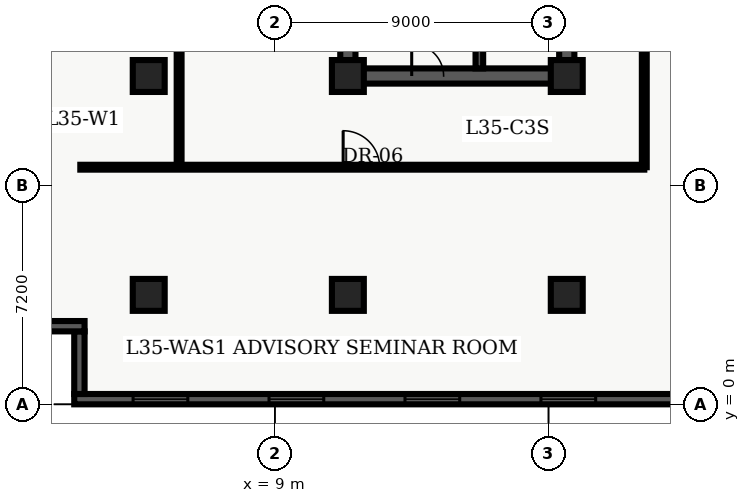
"""IFC4 building model, lengths in metres.
Left out: names, types, materials, properties, quantities, classifications, styles, units other than length and angle.
Written with IfcOpenShell. Run it as: python <this file> out.ifc"""

import sys

from ifc_helpers import new_model, entity, si_unit, converted_unit, direction, frame, origin_with_axes, origin_2d_with_axis, place, context, subcontext, project, spatial, polyline, rectangle, outline, extrude, element, fill, save


model = new_model("IFC4")
c1 = context("Model", 3, precision=1e-05, world=origin_with_axes(), true_north=direction((0.0, 1.0)))
c2 = subcontext(c1, "Body", "Model", "MODEL_VIEW")
j1 = project(units=[si_unit("LENGTHUNIT", "METRE"), converted_unit("PLANEANGLEUNIT", "DEGREE", entity("IfcPlaneAngleMeasure", 0.017), si_unit("PLANEANGLEUNIT", "RADIAN"), dimensions=[0, 0, 0, 0, 0, 0, 0])], contexts=[c1])
p1 = place(None, origin_with_axes())
s1 = spatial("IfcSite", under=j1, at=p1, CompositionType="ELEMENT")
p2 = place(p1, origin_with_axes())
s2 = spatial("IfcBuilding", under=s1, at=p2, CompositionType="ELEMENT")
p3 = place(p2, frame((0.0, 0.0, 144.6), z_axis=(0.0, 0.0, 1.0), x_axis=(1.0, 0.0, 0.0)))
s3 = spatial("IfcBuildingStorey", under=s2, at=p3, CompositionType="ELEMENT", Elevation=144.6)
p4 = place(p3, frame((11.4, 10.8, 0.0), z_axis=(0.0, 0.0, 1.0), x_axis=(0.0, 1.0, 0.0)))
e1 = element("IfcWall", 1, at=p4, inside=s3, PredefinedType="SHEAR", context=c2, shape_type="SweptSolid", body=[
    extrude(outline(polyline([(0.0, -0.25), (27.0, -0.25), (27.0, 0.25), (0.0, 0.25), (0.0, -0.25)])), origin_with_axes(), (0.0, 0.0, 1.0), 3.66),
])
p5 = place(p3, frame((11.4, 10.8, 0.0), z_axis=(0.0, 0.0, 1.0), x_axis=(1.0, 0.0, 0.0)))
e2 = element("IfcWall", 2, at=p5, inside=s3, PredefinedType="SHEAR", context=c2, shape_type="SweptSolid", body=[
    extrude(outline(polyline([(0.0, -0.25), (7.2, -0.25), (7.2, 0.25), (0.0, 0.25), (0.0, -0.25)])), origin_with_axes(), (0.0, 0.0, 1.0), 3.66),
])
p6 = place(p5, frame((2.625, 0.0, 0.0), z_axis=(0.0, 0.0, 1.0), x_axis=(1.0, 0.0, 0.0)))
e3 = element("IfcOpeningElement", 3, at=p6, cuts=e2, PredefinedType="OPENING", context=c2, shape_type="SweptSolid", body=[
    extrude(rectangle(XDim=1.05, YDim=0.52, at=origin_2d_with_axis()), origin_with_axes(), (0.0, 0.0, 1.0), 2.15),
])
p7 = place(p3, frame((18.6, 10.8, 0.0), z_axis=(0.0, 0.0, 1.0), x_axis=(0.0, 1.0, 0.0)))
e4 = element("IfcWall", 4, at=p7, inside=s3, PredefinedType="SHEAR", context=c2, shape_type="SweptSolid", body=[
    extrude(outline(polyline([(0.0, -0.25), (13.5, -0.25), (13.5, 0.25), (0.0, 0.25), (0.0, -0.25)])), origin_with_axes(), (0.0, 0.0, 1.0), 3.66),
])
p8 = place(p7, frame((11.125, 0.0, 0.0), z_axis=(0.0, 0.0, 1.0), x_axis=(1.0, 0.0, 0.0)))
e5 = element("IfcOpeningElement", 5, at=p8, cuts=e4, PredefinedType="OPENING", context=c2, shape_type="SweptSolid", body=[
    extrude(rectangle(XDim=1.05, YDim=0.52, at=origin_2d_with_axis()), origin_with_axes(), (0.0, 0.0, 1.0), 2.15),
])
p9 = place(p7, frame((2.425, 0.0, 0.0), z_axis=(0.0, 0.0, 1.0), x_axis=(1.0, 0.0, 0.0)))
e6 = element("IfcOpeningElement", 6, at=p9, cuts=e4, PredefinedType="OPENING", context=c2, shape_type="SweptSolid", body=[
    extrude(rectangle(XDim=1.05, YDim=0.52, at=origin_2d_with_axis()), origin_with_axes(), (0.0, 0.0, 1.0), 2.15),
])
p10 = place(p7, frame((6.725, 0.0, 0.0), z_axis=(0.0, 0.0, 1.0), x_axis=(1.0, 0.0, 0.0)))
e7 = element("IfcOpeningElement", 7, at=p10, cuts=e4, PredefinedType="OPENING", context=c2, shape_type="SweptSolid", body=[
    extrude(rectangle(XDim=1.05, YDim=0.52, at=origin_2d_with_axis()), origin_with_axes(), (0.0, 0.0, 1.0), 2.15),
])
p11 = place(p3, frame((15.725, 11.05, 0.0), z_axis=(0.0, 0.0, 1.0), x_axis=(0.0, 1.0, 0.0)))
e8 = element("IfcWall", 8, at=p11, inside=s3, PredefinedType="SHEAR", context=c2, shape_type="SweptSolid", body=[
    extrude(outline(polyline([(0.0, -0.125), (8.65, -0.125), (8.65, 0.125), (0.0, 0.125), (0.0, -0.125)])), origin_with_axes(), (0.0, 0.0, 1.0), 3.66),
])
for number, where, z_axis, x_axis in (
    (9, (11.4, 3.6, 0.0), (0.0, 0.0, 1.0), (1.0, 0.0, 0.0)),
    (10, (11.4, 10.8, 0.0), (0.0, 0.0, 1.0), (1.0, 0.0, 0.0)),
    (11, (18.6, 3.6, 0.0), (0.0, 0.0, 1.0), (1.0, 0.0, 0.0)),
    (12, (18.6, 10.8, 0.0), (0.0, 0.0, 1.0), (1.0, 0.0, 0.0)),
    (13, (4.85, 3.6, 0.0), (0.0, 0.0, 1.0), (1.0, 0.0, 0.0)),
    (14, (4.85, 10.8, 0.0), (0.0, 0.0, 1.0), (1.0, 0.0, 0.0)),
):
    element("IfcColumn", number, at=place(p3, frame(where, z_axis=z_axis, x_axis=x_axis)), inside=s3, PredefinedType="COLUMN", context=c2, shape_type="SweptSolid", body=[
        extrude(rectangle(XDim=1.05, YDim=1.05, at=origin_2d_with_axis()), origin_with_axes(), (0.0, 0.0, 1.0), 3.9),
    ])
p12 = place(p3, frame((2.6, 7.8, 0.0), z_axis=(0.0, 0.0, 1.0), x_axis=(1.0, 0.0, 0.0)))
e15 = element("IfcWall", 15, at=p12, inside=s3, PredefinedType="PARTITIONING", context=c2, shape_type="SweptSolid", body=[
    extrude(outline(polyline([(0.0, -0.08), (18.55, -0.08), (18.55, 0.08), (0.0, 0.08), (0.0, -0.08)])), origin_with_axes(), (0.0, 0.0, 1.0), 2.7),
])
p13 = place(p12, frame((9.245, 0.0, 0.0), z_axis=(0.0, 0.0, 1.0), x_axis=(1.0, 0.0, 0.0)))
e16 = element("IfcOpeningElement", 16, at=p13, cuts=e15, PredefinedType="OPENING", context=c2, shape_type="SweptSolid", body=[
    extrude(rectangle(XDim=1.2, YDim=0.18, at=origin_2d_with_axis()), origin_with_axes(), (0.0, 0.0, 1.0), 2.2),
])
p14 = place(p3, frame((21.15, 7.8, 0.0), z_axis=(0.0, 0.0, 1.0), x_axis=(0.0, 1.0, 0.0)))
e17 = element("IfcWall", 17, at=p14, inside=s3, PredefinedType="PARTITIONING", context=c2, shape_type="SweptSolid", body=[
    extrude(outline(polyline([(0.0, -0.08), (32.7, -0.08), (32.7, 0.08), (0.0, 0.08), (0.0, -0.08)])), origin_with_axes(), (0.0, 0.0, 1.0), 2.7),
])
p15 = place(p14, frame((5.475, 0.0, 0.0), z_axis=(0.0, 0.0, 1.0), x_axis=(1.0, 0.0, 0.0)))
e18 = element("IfcOpeningElement", 18, at=p15, cuts=e17, PredefinedType="OPENING", context=c2, shape_type="SweptSolid", body=[
    extrude(rectangle(XDim=1.05, YDim=0.18, at=origin_2d_with_axis()), origin_with_axes(), (0.0, 0.0, 1.0), 2.15),
])
p16 = place(p3, frame((5.85, 7.8, 0.0), z_axis=(0.0, 0.0, 1.0), x_axis=(0.0, 1.0, 0.0)))
e19 = element("IfcWall", 19, at=p16, inside=s3, PredefinedType="PARTITIONING", context=c2, shape_type="SweptSolid", body=[
    extrude(outline(polyline([(0.0, -0.08), (32.7, -0.08), (32.7, 0.08), (0.0, 0.08), (0.0, -0.08)])), origin_with_axes(), (0.0, 0.0, 1.0), 2.7),
])
p17 = place(p16, frame((7.181, 0.0, 0.0), z_axis=(0.0, 0.0, 1.0), x_axis=(1.0, 0.0, 0.0)))
e20 = element("IfcOpeningElement", 20, at=p17, cuts=e19, PredefinedType="OPENING", context=c2, shape_type="SweptSolid", body=[
    extrude(rectangle(XDim=1.0, YDim=0.18, at=origin_2d_with_axis()), origin_with_axes(), (0.0, 0.0, 1.0), 2.15),
])
p18 = place(p16, frame((23.401, 0.0, 0.0), z_axis=(0.0, 0.0, 1.0), x_axis=(1.0, 0.0, 0.0)))
e21 = element("IfcOpeningElement", 21, at=p18, cuts=e19, PredefinedType="OPENING", context=c2, shape_type="SweptSolid", body=[
    extrude(rectangle(XDim=1.0, YDim=0.18, at=origin_2d_with_axis()), origin_with_axes(), (0.0, 0.0, 1.0), 2.15),
])
p19 = place(p3, frame((57.26, 0.17, 0.0), z_axis=(0.0, 0.0, 1.0), x_axis=(-1.0, 0.0, 0.0)))
e22 = element("IfcWall", 22, at=p19, inside=s3, PredefinedType="SOLIDWALL", context=c2, shape_type="SweptSolid", body=[
    extrude(outline(polyline([(0.0, -0.17), (54.86, -0.17), (54.86, 0.17), (0.0, 0.17), (0.0, -0.17)])), origin_with_axes(), (0.0, 0.0, 1.0), 3.66),
])
p20 = place(p19, frame((2.836, 0.0, 0.45), z_axis=(0.0, 0.0, 1.0), x_axis=(1.0, 0.0, 0.0)))
e23 = element("IfcOpeningElement", 23, at=p20, cuts=e22, PredefinedType="OPENING", context=c2, shape_type="SweptSolid", body=[
    extrude(rectangle(XDim=1.8, YDim=0.36, at=origin_2d_with_axis()), origin_with_axes(), (0.0, 0.0, 1.0), 2.1),
])
p21 = place(p19, frame((7.307, 0.0, 0.45), z_axis=(0.0, 0.0, 1.0), x_axis=(1.0, 0.0, 0.0)))
e24 = element("IfcOpeningElement", 24, at=p21, cuts=e22, PredefinedType="OPENING", context=c2, shape_type="SweptSolid", body=[
    extrude(rectangle(XDim=1.8, YDim=0.36, at=origin_2d_with_axis()), origin_with_axes(), (0.0, 0.0, 1.0), 2.1),
])
p22 = place(p19, frame((11.779, 0.0, 0.45), z_axis=(0.0, 0.0, 1.0), x_axis=(1.0, 0.0, 0.0)))
e25 = element("IfcOpeningElement", 25, at=p22, cuts=e22, PredefinedType="OPENING", context=c2, shape_type="SweptSolid", body=[
    extrude(rectangle(XDim=1.8, YDim=0.36, at=origin_2d_with_axis()), origin_with_axes(), (0.0, 0.0, 1.0), 2.1),
])
p23 = place(p19, frame((16.251, 0.0, 0.45), z_axis=(0.0, 0.0, 1.0), x_axis=(1.0, 0.0, 0.0)))
e26 = element("IfcOpeningElement", 26, at=p23, cuts=e22, PredefinedType="OPENING", context=c2, shape_type="SweptSolid", body=[
    extrude(rectangle(XDim=1.8, YDim=0.36, at=origin_2d_with_axis()), origin_with_axes(), (0.0, 0.0, 1.0), 2.1),
])
p24 = place(p19, frame((20.723, 0.0, 0.45), z_axis=(0.0, 0.0, 1.0), x_axis=(1.0, 0.0, 0.0)))
e27 = element("IfcOpeningElement", 27, at=p24, cuts=e22, PredefinedType="OPENING", context=c2, shape_type="SweptSolid", body=[
    extrude(rectangle(XDim=1.8, YDim=0.36, at=origin_2d_with_axis()), origin_with_axes(), (0.0, 0.0, 1.0), 2.1),
])
p25 = place(p19, frame((34.138, 0.0, 0.45), z_axis=(0.0, 0.0, 1.0), x_axis=(1.0, 0.0, 0.0)))
e28 = element("IfcOpeningElement", 28, at=p25, cuts=e22, PredefinedType="OPENING", context=c2, shape_type="SweptSolid", body=[
    extrude(rectangle(XDim=1.8, YDim=0.36, at=origin_2d_with_axis()), origin_with_axes(), (0.0, 0.0, 1.0), 2.1),
])
p26 = place(p19, frame((38.609, 0.0, 0.45), z_axis=(0.0, 0.0, 1.0), x_axis=(1.0, 0.0, 0.0)))
e29 = element("IfcOpeningElement", 29, at=p26, cuts=e22, PredefinedType="OPENING", context=c2, shape_type="SweptSolid", body=[
    extrude(rectangle(XDim=1.8, YDim=0.36, at=origin_2d_with_axis()), origin_with_axes(), (0.0, 0.0, 1.0), 2.1),
])
p27 = place(p19, frame((43.081, 0.0, 0.45), z_axis=(0.0, 0.0, 1.0), x_axis=(1.0, 0.0, 0.0)))
e30 = element("IfcOpeningElement", 30, at=p27, cuts=e22, PredefinedType="OPENING", context=c2, shape_type="SweptSolid", body=[
    extrude(rectangle(XDim=1.8, YDim=0.36, at=origin_2d_with_axis()), origin_with_axes(), (0.0, 0.0, 1.0), 2.1),
])
p28 = place(p19, frame((47.553, 0.0, 0.45), z_axis=(0.0, 0.0, 1.0), x_axis=(1.0, 0.0, 0.0)))
e31 = element("IfcOpeningElement", 31, at=p28, cuts=e22, PredefinedType="OPENING", context=c2, shape_type="SweptSolid", body=[
    extrude(rectangle(XDim=1.8, YDim=0.36, at=origin_2d_with_axis()), origin_with_axes(), (0.0, 0.0, 1.0), 2.1),
])
p29 = place(p19, frame((52.024, 0.0, 0.45), z_axis=(0.0, 0.0, 1.0), x_axis=(1.0, 0.0, 0.0)))
e32 = element("IfcOpeningElement", 32, at=p29, cuts=e22, PredefinedType="OPENING", context=c2, shape_type="SweptSolid", body=[
    extrude(rectangle(XDim=1.8, YDim=0.36, at=origin_2d_with_axis()), origin_with_axes(), (0.0, 0.0, 1.0), 2.1),
])
p30 = place(p3, frame((2.57, 0.34, 0.0), z_axis=(0.0, 0.0, 1.0), x_axis=(0.0, 1.0, 0.0)))
e33 = element("IfcWall", 33, at=p30, inside=s3, PredefinedType="SOLIDWALL", context=c2, shape_type="SweptSolid", body=[
    extrude(outline(polyline([(0.0, -0.17), (2.06, -0.17), (2.06, 0.17), (0.0, 0.17), (0.0, -0.17)])), origin_with_axes(), (0.0, 0.0, 1.0), 3.66),
])
p31 = place(p3, frame((2.74, 2.57, 0.0), z_axis=(0.0, 0.0, 1.0), x_axis=(-1.0, 0.0, 0.0)))
e34 = element("IfcWall", 34, at=p31, inside=s3, PredefinedType="SOLIDWALL", context=c2, shape_type="SweptSolid", body=[
    extrude(outline(polyline([(0.0, -0.17), (2.74, -0.17), (2.74, 0.17), (0.0, 0.17), (0.0, -0.17)])), origin_with_axes(), (0.0, 0.0, 1.0), 3.66),
])
p32 = place(p5, frame((2.625, 0.0, 0.0), z_axis=(0.0, 0.0, 1.0), x_axis=(1.0, 0.0, 0.0)))
e35 = element("IfcDoor", 35, at=p32, inside=s3, OperationType="SINGLE_SWING_LEFT", PredefinedType="DOOR", context=c2, shape_type="SweptSolid", body=[
    extrude(rectangle(XDim=1.05, YDim=0.09, at=origin_2d_with_axis()), origin_with_axes(), (0.0, 0.0, 1.0), 2.15),
])
fill(e3, e35)
p33 = place(p12, frame((9.245, 0.0, 0.0), z_axis=(0.0, 0.0, 1.0), x_axis=(1.0, 0.0, 0.0)))
e36 = element("IfcDoor", 36, at=p33, inside=s3, OperationType="SINGLE_SWING_LEFT", PredefinedType="DOOR", context=c2, shape_type="SweptSolid", body=[
    extrude(rectangle(XDim=1.2, YDim=0.09, at=origin_2d_with_axis()), origin_with_axes(), (0.0, 0.0, 1.0), 2.2),
])
fill(e16, e36)
p34 = place(p19, frame((38.609, 0.0, 0.45), z_axis=(0.0, 0.0, 1.0), x_axis=(1.0, 0.0, 0.0)))
e37 = element("IfcWindow", 37, at=p34, inside=s3, PredefinedType="WINDOW", context=c2, shape_type="SweptSolid", body=[
    extrude(rectangle(XDim=1.8, YDim=0.09, at=origin_2d_with_axis()), origin_with_axes(), (0.0, 0.0, 1.0), 2.1),
])
fill(e29, e37)
p35 = place(p19, frame((43.081, 0.0, 0.45), z_axis=(0.0, 0.0, 1.0), x_axis=(1.0, 0.0, 0.0)))
e38 = element("IfcWindow", 38, at=p35, inside=s3, PredefinedType="WINDOW", context=c2, shape_type="SweptSolid", body=[
    extrude(rectangle(XDim=1.8, YDim=0.09, at=origin_2d_with_axis()), origin_with_axes(), (0.0, 0.0, 1.0), 2.1),
])
fill(e30, e38)
p36 = place(p19, frame((47.553, 0.0, 0.45), z_axis=(0.0, 0.0, 1.0), x_axis=(1.0, 0.0, 0.0)))
e39 = element("IfcWindow", 39, at=p36, inside=s3, PredefinedType="WINDOW", context=c2, shape_type="SweptSolid", body=[
    extrude(rectangle(XDim=1.8, YDim=0.09, at=origin_2d_with_axis()), origin_with_axes(), (0.0, 0.0, 1.0), 2.1),
])
fill(e31, e39)
p37 = place(p19, frame((52.024, 0.0, 0.45), z_axis=(0.0, 0.0, 1.0), x_axis=(1.0, 0.0, 0.0)))
e40 = element("IfcWindow", 40, at=p37, inside=s3, PredefinedType="WINDOW", context=c2, shape_type="SweptSolid", body=[
    extrude(rectangle(XDim=1.8, YDim=0.09, at=origin_2d_with_axis()), origin_with_axes(), (0.0, 0.0, 1.0), 2.1),
])
fill(e32, e40)
save(model, sys.argv[1])
